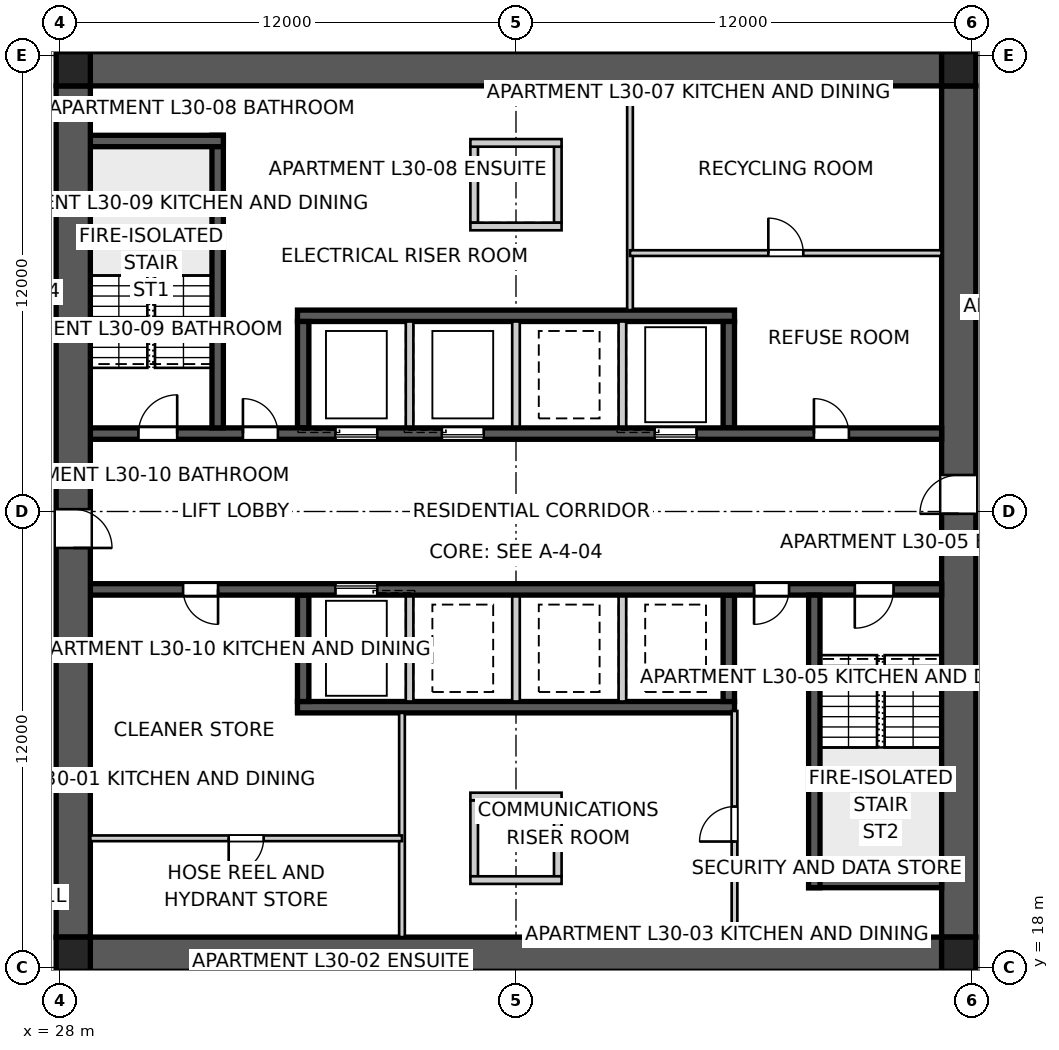
"""IFC4 building model, lengths in metres.
Left out: names, types, materials, properties, quantities, classifications, styles, units other than length and angle.
Written with IfcOpenShell. Run it as: python <this file> out.ifc"""

import sys

from ifc_helpers import new_model, si_unit, direction, frame, frame_2d, origin, origin_2d, place, context, subcontext, project, spatial, polyline, rectangle, outline, extrude, element, fill, save


model = new_model("IFC4")
c1 = context("Model", 3, precision=1e-05, world=origin(), true_north=direction((0.0, 1.0)))
c2 = subcontext(c1, "Body", "Model", "MODEL_VIEW")
j1 = project(units=[si_unit("LENGTHUNIT", "METRE"), si_unit("PLANEANGLEUNIT", "RADIAN")], contexts=[c1])
p1 = place(None, origin())
s1 = spatial("IfcSite", under=j1, at=p1, CompositionType="ELEMENT")
p2 = place(p1, origin())
s2 = spatial("IfcBuilding", under=s1, at=p2, CompositionType="ELEMENT")
p3 = place(p2, frame((0.0, 0.0, 111.6)))
s3 = spatial("IfcBuildingStorey", under=s2, at=p3, CompositionType="ELEMENT", Elevation=111.6)
for number, where, z_axis, x_axis in (
    (1, (28.8, 41.65, 0.0), (0.0, 0.0, 1.0), (1.0, 0.0, 0.0)),
    (2, (51.2, 18.35, 0.0), (0.0, 0.0, 1.0), (-1.0, 0.0, 0.0)),
):
    element("IfcWall", number, at=place(p3, frame(where, z_axis=z_axis, x_axis=x_axis)), inside=s3, PredefinedType="SHEAR", context=c2, shape_type="SweptSolid", body=[
        extrude(outline(polyline([(0.0, -0.45), (22.4, -0.45), (22.4, -0.025), (22.85, -0.025), (22.85, 0.025), (22.4, 0.025), (22.4, 0.45), (0.0, 0.45), (0.0, 0.025), (-0.45, 0.025), (-0.45, -0.025), (0.0, -0.025), (0.0, -0.45)])), origin(), (0.0, 0.0, 1.0), 3.4),
    ])
p4 = place(p3, frame((51.65, 18.8, 0.0), z_axis=(0.0, 0.0, 1.0), x_axis=(0.0, 1.0, 0.0)))
e3 = element("IfcWall", 3, at=p4, inside=s3, PredefinedType="SHEAR", context=c2, shape_type="SweptSolid", body=[
    extrude(outline(polyline([(0.0, -0.45), (22.4, -0.45), (22.4, -0.025), (22.85, -0.025), (22.85, 0.025), (22.4, 0.025), (22.4, 0.45), (0.0, 0.45), (0.0, 0.025), (-0.45, 0.025), (-0.45, -0.025), (0.0, -0.025), (0.0, -0.45)])), origin(), (0.0, 0.0, 1.0), 3.4),
])
p5 = place(p4, frame((11.14, 0.0, 0.0)))
e4 = element("IfcOpeningElement", 4, at=p5, cuts=e3, PredefinedType="OPENING", context=c2, shape_type="SweptSolid", body=[
    extrude(rectangle(XDim=1.02, YDim=2.4, at=frame_2d((0.51, 1.2))), frame((0.0, 0.46, 0.0), z_axis=(0.0, -1.0, 0.0), x_axis=(1.0, 0.0, 0.0)), (0.0, 0.0, 1.0), 0.92),
])
p6 = place(p3, frame((28.35, 41.2, 0.0), z_axis=(0.0, 0.0, 1.0), x_axis=(0.0, -1.0, 0.0)))
e5 = element("IfcWall", 5, at=p6, inside=s3, PredefinedType="SHEAR", context=c2, shape_type="SweptSolid", body=[
    extrude(outline(polyline([(0.0, -0.45), (22.4, -0.45), (22.4, -0.025), (22.85, -0.025), (22.85, 0.025), (22.4, 0.025), (22.4, 0.45), (0.0, 0.45), (0.0, 0.025), (-0.45, 0.025), (-0.45, -0.025), (0.0, -0.025), (0.0, -0.45)])), origin(), (0.0, 0.0, 1.0), 3.4),
])
p7 = place(p6, frame((11.14, 0.0, 0.0)))
e6 = element("IfcOpeningElement", 6, at=p7, cuts=e5, PredefinedType="OPENING", context=c2, shape_type="SweptSolid", body=[
    extrude(rectangle(XDim=1.02, YDim=2.4, at=frame_2d((0.51, 1.2))), frame((0.0, 0.46, 0.0), z_axis=(0.0, -1.0, 0.0), x_axis=(1.0, 0.0, 0.0)), (0.0, 0.0, 1.0), 0.92),
])
p8 = place(p3, frame((28.8, 32.05, 0.0), z_axis=(0.0, 0.0, 1.0), x_axis=(1.0, 0.0, 0.0)))
e7 = element("IfcWall", 7, at=p8, inside=s3, PredefinedType="SHEAR", context=c2, shape_type="SweptSolid", body=[
    extrude(rectangle(XDim=22.4, YDim=0.3, at=frame_2d((11.2, 0.0))), origin(), (0.0, 0.0, 1.0), 3.4),
])
p9 = place(p8, frame((19.04, 0.0, 0.0)))
e8 = element("IfcOpeningElement", 8, at=p9, cuts=e7, PredefinedType="OPENING", context=c2, shape_type="SweptSolid", body=[
    extrude(rectangle(XDim=0.92, YDim=2.1, at=frame_2d((0.46, 1.05))), frame((0.0, 0.16, 0.0), z_axis=(0.0, -1.0, 0.0), x_axis=(1.0, 0.0, 0.0)), (0.0, 0.0, 1.0), 0.32),
])
p10 = place(p8, frame((1.265, 0.0, 0.0)))
e9 = element("IfcOpeningElement", 9, at=p10, cuts=e7, PredefinedType="OPENING", context=c2, shape_type="SweptSolid", body=[
    extrude(rectangle(XDim=1.02, YDim=2.1, at=frame_2d((0.51, 1.05))), frame((0.0, 0.16, 0.0), z_axis=(0.0, -1.0, 0.0), x_axis=(1.0, 0.0, 0.0)), (0.0, 0.0, 1.0), 0.32),
])
p11 = place(p8, frame((4.015, 0.0, 0.0)))
e10 = element("IfcOpeningElement", 10, at=p11, cuts=e7, PredefinedType="OPENING", context=c2, shape_type="SweptSolid", body=[
    extrude(rectangle(XDim=0.92, YDim=2.1, at=frame_2d((0.46, 1.05))), frame((0.0, 0.16, 0.0), z_axis=(0.0, -1.0, 0.0), x_axis=(1.0, 0.0, 0.0)), (0.0, 0.0, 1.0), 0.32),
])
p12 = place(p8, frame((6.45, 0.0, 0.0)))
e11 = element("IfcOpeningElement", 11, at=p12, cuts=e7, PredefinedType="OPENING", context=c2, shape_type="SweptSolid", body=[
    extrude(rectangle(XDim=1.1, YDim=2.1, at=frame_2d((0.55, 1.05))), frame((0.0, 0.16, 0.0), z_axis=(0.0, -1.0, 0.0), x_axis=(1.0, 0.0, 0.0)), (0.0, 0.0, 1.0), 0.32),
])
p13 = place(p8, frame((9.25, 0.0, 0.0)))
e12 = element("IfcOpeningElement", 12, at=p13, cuts=e7, PredefinedType="OPENING", context=c2, shape_type="SweptSolid", body=[
    extrude(rectangle(XDim=1.1, YDim=2.1, at=frame_2d((0.55, 1.05))), frame((0.0, 0.16, 0.0), z_axis=(0.0, -1.0, 0.0), x_axis=(1.0, 0.0, 0.0)), (0.0, 0.0, 1.0), 0.32),
])
p14 = place(p8, frame((14.85, 0.0, 0.0)))
e13 = element("IfcOpeningElement", 13, at=p14, cuts=e7, PredefinedType="OPENING", context=c2, shape_type="SweptSolid", body=[
    extrude(rectangle(XDim=1.1, YDim=2.1, at=frame_2d((0.55, 1.05))), frame((0.0, 0.16, 0.0), z_axis=(0.0, -1.0, 0.0), x_axis=(1.0, 0.0, 0.0)), (0.0, 0.0, 1.0), 0.32),
])
p15 = place(p3, frame((51.2, 27.95, 0.0), z_axis=(0.0, 0.0, 1.0), x_axis=(-1.0, 0.0, 0.0)))
e14 = element("IfcWall", 14, at=p15, inside=s3, PredefinedType="SHEAR", context=c2, shape_type="SweptSolid", body=[
    extrude(rectangle(XDim=22.4, YDim=0.3, at=frame_2d((11.2, 0.0))), origin(), (0.0, 0.0, 1.0), 3.4),
])
p16 = place(p15, frame((19.04, 0.0, 0.0)))
e15 = element("IfcOpeningElement", 15, at=p16, cuts=e14, PredefinedType="OPENING", context=c2, shape_type="SweptSolid", body=[
    extrude(rectangle(XDim=0.92, YDim=2.1, at=frame_2d((0.46, 1.05))), frame((0.0, 0.16, 0.0), z_axis=(0.0, -1.0, 0.0), x_axis=(1.0, 0.0, 0.0)), (0.0, 0.0, 1.0), 0.32),
])
p17 = place(p15, frame((1.265, 0.0, 0.0)))
e16 = element("IfcOpeningElement", 16, at=p17, cuts=e14, PredefinedType="OPENING", context=c2, shape_type="SweptSolid", body=[
    extrude(rectangle(XDim=1.02, YDim=2.1, at=frame_2d((0.51, 1.05))), frame((0.0, 0.16, 0.0), z_axis=(0.0, -1.0, 0.0), x_axis=(1.0, 0.0, 0.0)), (0.0, 0.0, 1.0), 0.32),
])
p18 = place(p15, frame((4.015, 0.0, 0.0)))
e17 = element("IfcOpeningElement", 17, at=p18, cuts=e14, PredefinedType="OPENING", context=c2, shape_type="SweptSolid", body=[
    extrude(rectangle(XDim=0.92, YDim=2.1, at=frame_2d((0.46, 1.05))), frame((0.0, 0.16, 0.0), z_axis=(0.0, -1.0, 0.0), x_axis=(1.0, 0.0, 0.0)), (0.0, 0.0, 1.0), 0.32),
])
p19 = place(p15, frame((14.85, 0.0, 0.0)))
e18 = element("IfcOpeningElement", 18, at=p19, cuts=e14, PredefinedType="OPENING", context=c2, shape_type="SweptSolid", body=[
    extrude(rectangle(XDim=1.1, YDim=2.1, at=frame_2d((0.55, 1.05))), frame((0.0, 0.16, 0.0), z_axis=(0.0, -1.0, 0.0), x_axis=(1.0, 0.0, 0.0)), (0.0, 0.0, 1.0), 0.32),
])
for number, where, z_axis, x_axis in (
    (19, (34.25, 35.15, 0.0), (0.0, 0.0, 1.0), (1.0, 0.0, 0.0)),
    (20, (45.75, 24.85, 0.0), (0.0, 0.0, 1.0), (-1.0, 0.0, 0.0)),
):
    element("IfcWall", number, at=place(p3, frame(where, z_axis=z_axis, x_axis=x_axis)), inside=s3, PredefinedType="SHEAR", context=c2, shape_type="SweptSolid", body=[
        extrude(rectangle(XDim=11.5, YDim=0.3, at=frame_2d((5.75, 0.0))), origin(), (0.0, 0.0, 1.0), 3.4),
    ])
for number, where, z_axis, x_axis in (
    (21, (34.4, 32.2, 0.0), (0.0, 0.0, 1.0), (0.0, 1.0, 0.0)),
    (22, (45.6, 27.8, 0.0), (0.0, 0.0, 1.0), (0.0, -1.0, 0.0)),
):
    element("IfcWall", number, at=place(p3, frame(where, z_axis=z_axis, x_axis=x_axis)), inside=s3, PredefinedType="SHEAR", context=c2, shape_type="SweptSolid", body=[
        extrude(rectangle(XDim=2.8, YDim=0.3, at=frame_2d((1.4, 0.0))), origin(), (0.0, 0.0, 1.0), 3.4),
    ])
for number, where, z_axis, x_axis in (
    (23, (37.2, 32.2, 0.0), (0.0, 0.0, 1.0), (0.0, 1.0, 0.0)),
    (24, (42.8, 27.8, 0.0), (0.0, 0.0, 1.0), (0.0, -1.0, 0.0)),
    (25, (40.0, 32.2, 0.0), (0.0, 0.0, 1.0), (0.0, 1.0, 0.0)),
    (26, (40.0, 27.8, 0.0), (0.0, 0.0, 1.0), (0.0, -1.0, 0.0)),
    (27, (42.8, 32.2, 0.0), (0.0, 0.0, 1.0), (0.0, 1.0, 0.0)),
    (28, (37.2, 27.8, 0.0), (0.0, 0.0, 1.0), (0.0, -1.0, 0.0)),
):
    element("IfcWall", number, at=place(p3, frame(where, z_axis=z_axis, x_axis=x_axis)), inside=s3, PredefinedType="SOLIDWALL", context=c2, shape_type="SweptSolid", body=[
        extrude(rectangle(XDim=2.8, YDim=0.2, at=frame_2d((1.4, 0.0))), origin(), (0.0, 0.0, 1.0), 3.4),
    ])
for number, where, z_axis, x_axis in (
    (29, (45.6, 32.2, 0.0), (0.0, 0.0, 1.0), (0.0, 1.0, 0.0)),
    (30, (34.4, 27.8, 0.0), (0.0, 0.0, 1.0), (0.0, -1.0, 0.0)),
):
    element("IfcWall", number, at=place(p3, frame(where, z_axis=z_axis, x_axis=x_axis)), inside=s3, PredefinedType="SHEAR", context=c2, shape_type="SweptSolid", body=[
        extrude(rectangle(XDim=2.8, YDim=0.3, at=frame_2d((1.4, 0.0))), origin(), (0.0, 0.0, 1.0), 3.4),
    ])
p20 = place(p3, frame((32.15, 32.2, 0.0), z_axis=(0.0, 0.0, 1.0), x_axis=(0.0, 1.0, 0.0)))
e31 = element("IfcWall", 31, at=p20, inside=s3, PredefinedType="SHEAR", context=c2, shape_type="SweptSolid", body=[
    extrude(rectangle(XDim=7.7, YDim=0.3, at=frame_2d((3.85, 0.0))), origin(), (0.0, 0.0, 1.0), 3.4),
])
p21 = place(p3, frame((28.8, 39.75, 0.0), z_axis=(0.0, 0.0, 1.0), x_axis=(1.0, 0.0, 0.0)))
e32 = element("IfcWall", 32, at=p21, inside=s3, PredefinedType="SHEAR", context=c2, shape_type="SweptSolid", body=[
    extrude(rectangle(XDim=3.5, YDim=0.3, at=frame_2d((1.75, 0.0))), origin(), (0.0, 0.0, 1.0), 3.4),
])
p22 = place(p3, frame((47.85, 27.8, 0.0), z_axis=(0.0, 0.0, 1.0), x_axis=(0.0, -1.0, 0.0)))
e33 = element("IfcWall", 33, at=p22, inside=s3, PredefinedType="SHEAR", context=c2, shape_type="SweptSolid", body=[
    extrude(rectangle(XDim=7.7, YDim=0.3, at=frame_2d((3.85, 0.0))), origin(), (0.0, 0.0, 1.0), 3.4),
])
p23 = place(p3, frame((51.2, 20.25, 0.0), z_axis=(0.0, 0.0, 1.0), x_axis=(-1.0, 0.0, 0.0)))
e34 = element("IfcWall", 34, at=p23, inside=s3, PredefinedType="SHEAR", context=c2, shape_type="SweptSolid", body=[
    extrude(rectangle(XDim=3.5, YDim=0.3, at=frame_2d((1.75, 0.0))), origin(), (0.0, 0.0, 1.0), 3.4),
])
for number, where, z_axis, x_axis in (
    (35, (38.9, 37.6, 0.0), (0.0, 0.0, 1.0), (0.0, 1.0, 0.0)),
    (36, (41.1, 37.6, 0.0), (0.0, 0.0, 1.0), (0.0, 1.0, 0.0)),
):
    element("IfcWall", number, at=place(p3, frame(where, z_axis=z_axis, x_axis=x_axis)), inside=s3, PredefinedType="SOLIDWALL", context=c2, shape_type="SweptSolid", body=[
        extrude(rectangle(XDim=2.0, YDim=0.2, at=frame_2d((1.0, 0.0))), origin(), (0.0, 0.0, 1.0), 3.4),
    ])
for number, where, z_axis, x_axis in (
    (37, (38.8, 37.5, 0.0), (0.0, 0.0, 1.0), (1.0, 0.0, 0.0)),
    (38, (38.8, 39.7, 0.0), (0.0, 0.0, 1.0), (1.0, 0.0, 0.0)),
):
    element("IfcWall", number, at=place(p3, frame(where, z_axis=z_axis, x_axis=x_axis)), inside=s3, PredefinedType="SOLIDWALL", context=c2, shape_type="SweptSolid", body=[
        extrude(rectangle(XDim=2.4, YDim=0.2, at=frame_2d((1.2, 0.0))), origin(), (0.0, 0.0, 1.0), 3.4),
    ])
for number, where, z_axis, x_axis in (
    (39, (38.9, 22.4, 0.0), (0.0, 0.0, 1.0), (0.0, -1.0, 0.0)),
    (40, (41.1, 22.4, 0.0), (0.0, 0.0, 1.0), (0.0, -1.0, 0.0)),
):
    element("IfcWall", number, at=place(p3, frame(where, z_axis=z_axis, x_axis=x_axis)), inside=s3, PredefinedType="SOLIDWALL", context=c2, shape_type="SweptSolid", body=[
        extrude(rectangle(XDim=2.0, YDim=0.2, at=frame_2d((1.0, 0.0))), origin(), (0.0, 0.0, 1.0), 3.4),
    ])
for number, where, z_axis, x_axis in (
    (41, (38.8, 22.5, 0.0), (0.0, 0.0, 1.0), (1.0, 0.0, 0.0)),
    (42, (38.8, 20.3, 0.0), (0.0, 0.0, 1.0), (1.0, 0.0, 0.0)),
):
    element("IfcWall", number, at=place(p3, frame(where, z_axis=z_axis, x_axis=x_axis)), inside=s3, PredefinedType="SOLIDWALL", context=c2, shape_type="SweptSolid", body=[
        extrude(rectangle(XDim=2.4, YDim=0.2, at=frame_2d((1.2, 0.0))), origin(), (0.0, 0.0, 1.0), 3.4),
    ])
for number, where, z_axis, x_axis in (
    (43, (28.35, 18.35, 0.0), (0.0, 0.0, 1.0), (1.0, 0.0, 0.0)),
    (44, (51.65, 18.35, 0.0), (0.0, 0.0, 1.0), (1.0, 0.0, 0.0)),
    (45, (51.65, 41.65, 0.0), (0.0, 0.0, 1.0), (1.0, 0.0, 0.0)),
    (46, (28.35, 41.65, 0.0), (0.0, 0.0, 1.0), (1.0, 0.0, 0.0)),
):
    element("IfcColumn", number, at=place(p3, frame(where, z_axis=z_axis, x_axis=x_axis)), inside=s3, PredefinedType="COLUMN", context=c2, shape_type="SweptSolid", body=[
        extrude(rectangle(XDim=0.9, YDim=0.9, at=origin_2d()), origin(), (0.0, 0.0, 1.0), 3.4),
    ])
p24 = place(p3, frame((43.0, 41.2, 0.0), z_axis=(0.0, 0.0, 1.0), x_axis=(0.0, -1.0, 0.0)))
e47 = element("IfcWall", 47, at=p24, inside=s3, PredefinedType="SOLIDWALL", context=c2, shape_type="SweptSolid", body=[
    extrude(rectangle(XDim=5.9, YDim=0.15, at=frame_2d((2.95, 0.0))), origin(), (0.0, 0.0, 1.0), 3.25),
])
p25 = place(p3, frame((43.0, 36.8, 0.0), z_axis=(0.0, 0.0, 1.0), x_axis=(1.0, 0.0, 0.0)))
e48 = element("IfcWall", 48, at=p25, inside=s3, PredefinedType="SOLIDWALL", context=c2, shape_type="SweptSolid", body=[
    extrude(rectangle(XDim=8.2, YDim=0.15, at=frame_2d((4.1, 0.0))), origin(), (0.0, 0.0, 1.0), 3.25),
])
p26 = place(p25, frame((3.64, 0.0, 0.0)))
e49 = element("IfcOpeningElement", 49, at=p26, cuts=e48, PredefinedType="OPENING", context=c2, shape_type="SweptSolid", body=[
    extrude(rectangle(XDim=0.92, YDim=2.1, at=frame_2d((0.46, 1.05))), frame((0.0, 0.085, 0.0), z_axis=(0.0, -1.0, 0.0), x_axis=(1.0, 0.0, 0.0)), (0.0, 0.0, 1.0), 0.17),
])
p27 = place(p3, frame((45.75, 18.8, 0.0), z_axis=(0.0, 0.0, 1.0), x_axis=(0.0, 1.0, 0.0)))
e50 = element("IfcWall", 50, at=p27, inside=s3, PredefinedType="SOLIDWALL", context=c2, shape_type="SweptSolid", body=[
    extrude(rectangle(XDim=5.95, YDim=0.15, at=frame_2d((2.975, 0.0))), origin(), (0.0, 0.0, 1.0), 3.25),
])
p28 = place(p27, frame((2.515, 0.0, 0.0)))
e51 = element("IfcOpeningElement", 51, at=p28, cuts=e50, PredefinedType="OPENING", context=c2, shape_type="SweptSolid", body=[
    extrude(rectangle(XDim=0.92, YDim=2.1, at=frame_2d((0.46, 1.05))), frame((0.0, 0.085, 0.0), z_axis=(0.0, -1.0, 0.0), x_axis=(1.0, 0.0, 0.0)), (0.0, 0.0, 1.0), 0.17),
])
p29 = place(p3, frame((37.0, 18.8, 0.0), z_axis=(0.0, 0.0, 1.0), x_axis=(0.0, 1.0, 0.0)))
e52 = element("IfcWall", 52, at=p29, inside=s3, PredefinedType="SOLIDWALL", context=c2, shape_type="SweptSolid", body=[
    extrude(rectangle(XDim=5.9, YDim=0.15, at=frame_2d((2.95, 0.0))), origin(), (0.0, 0.0, 1.0), 3.25),
])
p30 = place(p3, frame((37.0, 21.4, 0.0), z_axis=(0.0, 0.0, 1.0), x_axis=(-1.0, 0.0, 0.0)))
e53 = element("IfcWall", 53, at=p30, inside=s3, PredefinedType="SOLIDWALL", context=c2, shape_type="SweptSolid", body=[
    extrude(rectangle(XDim=8.2, YDim=0.15, at=frame_2d((4.1, 0.0))), origin(), (0.0, 0.0, 1.0), 3.25),
])
p31 = place(p30, frame((3.64, 0.0, 0.0)))
e54 = element("IfcOpeningElement", 54, at=p31, cuts=e53, PredefinedType="OPENING", context=c2, shape_type="SweptSolid", body=[
    extrude(rectangle(XDim=0.92, YDim=2.1, at=frame_2d((0.46, 1.05))), frame((0.0, 0.085, 0.0), z_axis=(0.0, -1.0, 0.0), x_axis=(1.0, 0.0, 0.0)), (0.0, 0.0, 1.0), 0.17),
])
p32 = place(p9, origin())
e55 = element("IfcDoor", 55, at=p32, inside=s3, OperationType="SINGLE_SWING_LEFT", PredefinedType="DOOR", context=c2, shape_type="SweptSolid", body=[
    extrude(rectangle(XDim=0.92, YDim=2.1, at=frame_2d((0.46, 1.05))), frame((0.0, 0.025, 0.0), z_axis=(0.0, -1.0, 0.0), x_axis=(1.0, 0.0, 0.0)), (0.0, 0.0, 1.0), 0.05),
])
fill(e8, e55)
p33 = place(p16, origin())
e56 = element("IfcDoor", 56, at=p33, inside=s3, OperationType="SINGLE_SWING_LEFT", PredefinedType="DOOR", context=c2, shape_type="SweptSolid", body=[
    extrude(rectangle(XDim=0.92, YDim=2.1, at=frame_2d((0.46, 1.05))), frame((0.0, 0.025, 0.0), z_axis=(0.0, -1.0, 0.0), x_axis=(1.0, 0.0, 0.0)), (0.0, 0.0, 1.0), 0.05),
])
fill(e15, e56)
p34 = place(p17, origin())
e57 = element("IfcDoor", 57, at=p34, inside=s3, OperationType="SINGLE_SWING_RIGHT", PredefinedType="DOOR", context=c2, shape_type="SweptSolid", body=[
    extrude(rectangle(XDim=1.02, YDim=2.1, at=frame_2d((0.51, 1.05))), frame((0.0, 0.025, 0.0), z_axis=(0.0, -1.0, 0.0), x_axis=(1.0, 0.0, 0.0)), (0.0, 0.0, 1.0), 0.05),
])
fill(e16, e57)
p35 = place(p10, origin())
e58 = element("IfcDoor", 58, at=p35, inside=s3, OperationType="SINGLE_SWING_RIGHT", PredefinedType="DOOR", context=c2, shape_type="SweptSolid", body=[
    extrude(rectangle(XDim=1.02, YDim=2.1, at=frame_2d((0.51, 1.05))), frame((0.0, 0.025, 0.0), z_axis=(0.0, -1.0, 0.0), x_axis=(1.0, 0.0, 0.0)), (0.0, 0.0, 1.0), 0.05),
])
fill(e9, e58)
p36 = place(p11, origin())
e59 = element("IfcDoor", 59, at=p36, inside=s3, OperationType="SINGLE_SWING_LEFT", PredefinedType="DOOR", context=c2, shape_type="SweptSolid", body=[
    extrude(rectangle(XDim=0.92, YDim=2.1, at=frame_2d((0.46, 1.05))), frame((0.0, 0.025, 0.0), z_axis=(0.0, -1.0, 0.0), x_axis=(1.0, 0.0, 0.0)), (0.0, 0.0, 1.0), 0.05),
])
fill(e10, e59)
p37 = place(p18, origin())
e60 = element("IfcDoor", 60, at=p37, inside=s3, OperationType="SINGLE_SWING_RIGHT", PredefinedType="DOOR", context=c2, shape_type="SweptSolid", body=[
    extrude(rectangle(XDim=0.92, YDim=2.1, at=frame_2d((0.46, 1.05))), frame((0.0, 0.025, 0.0), z_axis=(0.0, -1.0, 0.0), x_axis=(1.0, 0.0, 0.0)), (0.0, 0.0, 1.0), 0.05),
])
fill(e17, e60)
p38 = place(p26, origin())
e61 = element("IfcDoor", 61, at=p38, inside=s3, OperationType="SINGLE_SWING_LEFT", PredefinedType="DOOR", context=c2, shape_type="SweptSolid", body=[
    extrude(rectangle(XDim=0.92, YDim=2.1, at=frame_2d((0.46, 1.05))), frame((0.0, 0.025, 0.0), z_axis=(0.0, -1.0, 0.0), x_axis=(1.0, 0.0, 0.0)), (0.0, 0.0, 1.0), 0.05),
])
fill(e49, e61)
p39 = place(p31, origin())
e62 = element("IfcDoor", 62, at=p39, inside=s3, OperationType="SINGLE_SWING_RIGHT", PredefinedType="DOOR", context=c2, shape_type="SweptSolid", body=[
    extrude(rectangle(XDim=0.92, YDim=2.1, at=frame_2d((0.46, 1.05))), frame((0.0, 0.025, 0.0), z_axis=(0.0, -1.0, 0.0), x_axis=(1.0, 0.0, 0.0)), (0.0, 0.0, 1.0), 0.05),
])
fill(e54, e62)
p40 = place(p28, origin())
e63 = element("IfcDoor", 63, at=p40, inside=s3, OperationType="SINGLE_SWING_LEFT", PredefinedType="DOOR", context=c2, shape_type="SweptSolid", body=[
    extrude(rectangle(XDim=0.92, YDim=2.1, at=frame_2d((0.46, 1.05))), frame((0.0, 0.025, 0.0), z_axis=(0.0, -1.0, 0.0), x_axis=(1.0, 0.0, 0.0)), (0.0, 0.0, 1.0), 0.05),
])
fill(e51, e63)
p41 = place(p5, origin())
e64 = element("IfcDoor", 64, at=p41, inside=s3, OperationType="SINGLE_SWING_LEFT", PredefinedType="DOOR", context=c2, shape_type="SweptSolid", body=[
    extrude(rectangle(XDim=1.02, YDim=2.4, at=frame_2d((0.51, 1.2))), frame((0.0, 0.025, 0.0), z_axis=(0.0, -1.0, 0.0), x_axis=(1.0, 0.0, 0.0)), (0.0, 0.0, 1.0), 0.05),
])
fill(e4, e64)
p42 = place(p7, origin())
e65 = element("IfcDoor", 65, at=p42, inside=s3, OperationType="SINGLE_SWING_RIGHT", PredefinedType="DOOR", context=c2, shape_type="SweptSolid", body=[
    extrude(rectangle(XDim=1.02, YDim=2.4, at=frame_2d((0.51, 1.2))), frame((0.0, 0.025, 0.0), z_axis=(0.0, -1.0, 0.0), x_axis=(1.0, 0.0, 0.0)), (0.0, 0.0, 1.0), 0.05),
])
fill(e6, e65)
p43 = place(p12, origin())
e66 = element("IfcDoor", 66, at=p43, inside=s3, OperationType="SLIDING_TO_LEFT", PredefinedType="DOOR", context=c2, shape_type="SweptSolid", body=[
    extrude(rectangle(XDim=1.1, YDim=2.1, at=frame_2d((0.55, 1.05))), frame((0.0, 0.025, 0.0), z_axis=(0.0, -1.0, 0.0), x_axis=(1.0, 0.0, 0.0)), (0.0, 0.0, 1.0), 0.05),
])
fill(e11, e66)
p44 = place(p13, origin())
e67 = element("IfcDoor", 67, at=p44, inside=s3, OperationType="SLIDING_TO_LEFT", PredefinedType="DOOR", context=c2, shape_type="SweptSolid", body=[
    extrude(rectangle(XDim=1.1, YDim=2.1, at=frame_2d((0.55, 1.05))), frame((0.0, 0.025, 0.0), z_axis=(0.0, -1.0, 0.0), x_axis=(1.0, 0.0, 0.0)), (0.0, 0.0, 1.0), 0.05),
])
fill(e12, e67)
p45 = place(p14, origin())
e68 = element("IfcDoor", 68, at=p45, inside=s3, OperationType="SLIDING_TO_LEFT", PredefinedType="DOOR", context=c2, shape_type="SweptSolid", body=[
    extrude(rectangle(XDim=1.1, YDim=2.1, at=frame_2d((0.55, 1.05))), frame((0.0, 0.025, 0.0), z_axis=(0.0, -1.0, 0.0), x_axis=(1.0, 0.0, 0.0)), (0.0, 0.0, 1.0), 0.05),
])
fill(e13, e68)
p46 = place(p19, origin())
e69 = element("IfcDoor", 69, at=p46, inside=s3, OperationType="SLIDING_TO_LEFT", PredefinedType="DOOR", context=c2, shape_type="SweptSolid", body=[
    extrude(rectangle(XDim=1.1, YDim=2.1, at=frame_2d((0.55, 1.05))), frame((0.0, 0.025, 0.0), z_axis=(0.0, -1.0, 0.0), x_axis=(1.0, 0.0, 0.0)), (0.0, 0.0, 1.0), 0.05),
])
fill(e18, e69)
save(model, sys.argv[1])
